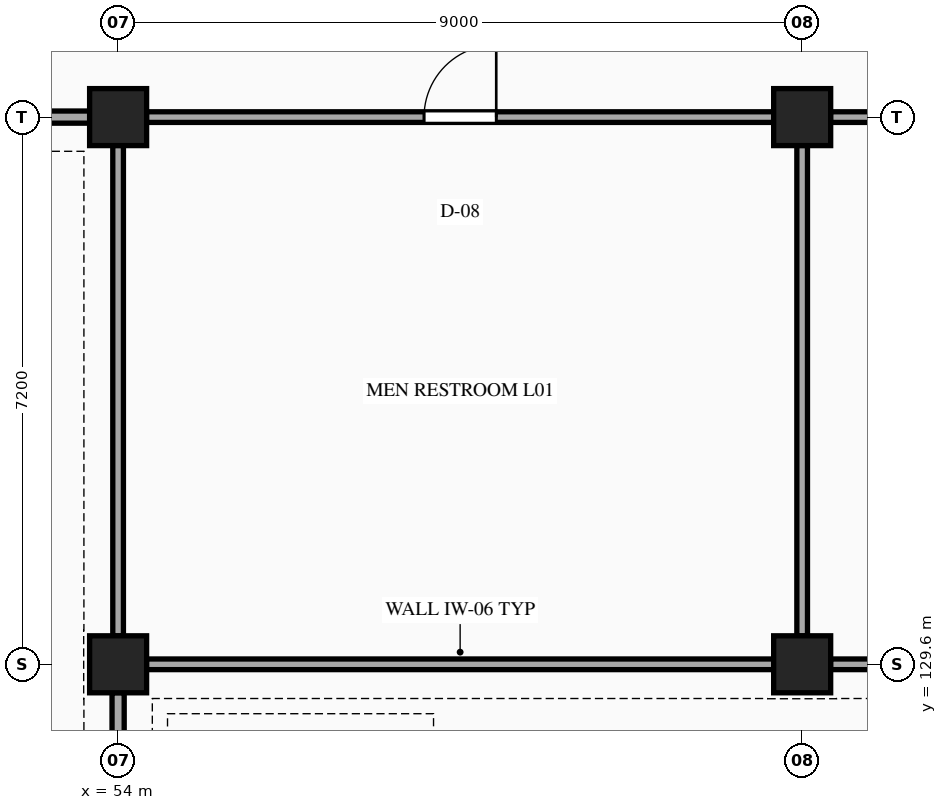
"""IFC4 building model, lengths in metres.
Left out: names, types, materials, properties, quantities, classifications, styles, units other than length and angle.
Written with IfcOpenShell. Run it as: python <this file> out.ifc"""

import sys

from ifc_helpers import new_model, si_unit, direction, frame, frame_2d, origin, origin_2d, place, context, subcontext, project, spatial, rectangle, extrude, element, fill, save


model = new_model("IFC4")
c1 = context("Model", 3, precision=1e-05, world=origin(), true_north=direction((0.0, 1.0)))
c2 = subcontext(c1, "Body", "Model", "MODEL_VIEW")
j1 = project(units=[si_unit("LENGTHUNIT", "METRE"), si_unit("PLANEANGLEUNIT", "RADIAN")], contexts=[c1])
p1 = place(None, origin())
s1 = spatial("IfcSite", under=j1, at=p1, CompositionType="ELEMENT")
p2 = place(p1, origin())
s2 = spatial("IfcBuilding", under=s1, at=p2, CompositionType="ELEMENT")
p3 = place(p2, frame((0.0, 0.0, 5.4)))
s3 = spatial("IfcBuildingStorey", under=s2, at=p3, CompositionType="ELEMENT", Elevation=5.4)
for number, where, z_axis, x_axis in (
    (1, (54.0, 129.6, 0.0), (0.0, 0.0, 1.0), (1.0, 0.0, 0.0)),
    (2, (54.0, 136.8, 0.0), (0.0, 0.0, 1.0), (1.0, 0.0, 0.0)),
    (3, (63.0, 129.6, 0.0), (0.0, 0.0, 1.0), (1.0, 0.0, 0.0)),
    (4, (63.0, 136.8, 0.0), (0.0, 0.0, 1.0), (1.0, 0.0, 0.0)),
):
    element("IfcColumn", number, at=place(p3, frame(where, z_axis=z_axis, x_axis=x_axis)), inside=s3, PredefinedType="COLUMN", context=c2, shape_type="SweptSolid", body=[
        extrude(rectangle(XDim=0.75, YDim=0.75, at=origin_2d()), origin(), (0.0, 0.0, 1.0), 5.4),
    ])
for number, where, z_axis, x_axis in (
    (5, (54.373, 129.6, 0.0), (0.0, 0.0, 1.0), (1.0, 0.0, 0.0)),
    (6, (63.373, 129.6, 0.0), (0.0, 0.0, 1.0), (1.0, 0.0, 0.0)),
):
    element("IfcWall", number, at=place(p3, frame(where, z_axis=z_axis, x_axis=x_axis)), inside=s3, PredefinedType="PARTITIONING", context=c2, shape_type="SweptSolid", body=[
        extrude(rectangle(XDim=8.254, YDim=0.14, at=frame_2d((4.127, 0.0))), origin(), (0.0, 0.0, 1.0), 4.498),
    ])
p4 = place(p3, frame((46.0, 136.8, 0.0), z_axis=(0.0, 0.0, 1.0), x_axis=(1.0, 0.0, 0.0)))
e7 = element("IfcWall", 7, at=p4, inside=s3, PredefinedType="PARTITIONING", context=c2, shape_type="SweptSolid", body=[
    extrude(rectangle(XDim=7.627, YDim=0.16, at=frame_2d((3.813, 0.0))), origin(), (0.0, 0.0, 1.0), 4.498),
])
p5 = place(p4, frame((3.013, 0.0, 0.0)))
e8 = element("IfcOpeningElement", 8, at=p5, cuts=e7, PredefinedType="OPENING", context=c2, shape_type="SweptSolid", body=[
    extrude(rectangle(XDim=1.6, YDim=2.2, at=frame_2d((0.8, 1.1))), frame((0.0, 0.09, 0.0), z_axis=(0.0, -1.0, 0.0), x_axis=(1.0, 0.0, 0.0)), (0.0, 0.0, 1.0), 0.18),
])
p6 = place(p3, frame((54.373, 136.8, 0.0), z_axis=(0.0, 0.0, 1.0), x_axis=(1.0, 0.0, 0.0)))
e9 = element("IfcWall", 9, at=p6, inside=s3, PredefinedType="PARTITIONING", context=c2, shape_type="SweptSolid", body=[
    extrude(rectangle(XDim=8.254, YDim=0.14, at=frame_2d((4.127, 0.0))), origin(), (0.0, 0.0, 1.0), 4.498),
])
p7 = place(p6, frame((3.652, 0.0, 0.0)))
e10 = element("IfcOpeningElement", 10, at=p7, cuts=e9, PredefinedType="OPENING", context=c2, shape_type="SweptSolid", body=[
    extrude(rectangle(XDim=0.95, YDim=2.1, at=frame_2d((0.475, 1.05))), frame((0.0, 0.08, 0.0), z_axis=(0.0, -1.0, 0.0), x_axis=(1.0, 0.0, 0.0)), (0.0, 0.0, 1.0), 0.16),
])
p8 = place(p3, frame((63.373, 136.8, 0.0), z_axis=(0.0, 0.0, 1.0), x_axis=(1.0, 0.0, 0.0)))
e11 = element("IfcWall", 11, at=p8, inside=s3, PredefinedType="PARTITIONING", context=c2, shape_type="SweptSolid", body=[
    extrude(rectangle(XDim=8.254, YDim=0.14, at=frame_2d((4.127, 0.0))), origin(), (0.0, 0.0, 1.0), 4.498),
])
p9 = place(p8, frame((3.652, 0.0, 0.0)))
e12 = element("IfcOpeningElement", 12, at=p9, cuts=e11, PredefinedType="OPENING", context=c2, shape_type="SweptSolid", body=[
    extrude(rectangle(XDim=0.95, YDim=2.1, at=frame_2d((0.475, 1.05))), frame((0.0, 0.08, 0.0), z_axis=(0.0, -1.0, 0.0), x_axis=(1.0, 0.0, 0.0)), (0.0, 0.0, 1.0), 0.16),
])
p10 = place(p3, frame((54.0, 123.6, 0.0), z_axis=(0.0, 0.0, 1.0), x_axis=(0.0, 1.0, 0.0)))
e13 = element("IfcWall", 13, at=p10, inside=s3, PredefinedType="PARTITIONING", context=c2, shape_type="SweptSolid", body=[
    extrude(rectangle(XDim=5.627, YDim=0.16, at=frame_2d((2.813, 0.0))), origin(), (0.0, 0.0, 1.0), 4.508),
])
for number, where, z_axis, x_axis in (
    (14, (54.0, 129.973, 0.0), (0.0, 0.0, 1.0), (0.0, 1.0, 0.0)),
    (15, (63.0, 129.973, 0.0), (0.0, 0.0, 1.0), (0.0, 1.0, 0.0)),
):
    element("IfcWall", number, at=place(p3, frame(where, z_axis=z_axis, x_axis=x_axis)), inside=s3, PredefinedType="PARTITIONING", context=c2, shape_type="SweptSolid", body=[
        extrude(rectangle(XDim=6.454, YDim=0.14, at=frame_2d((3.227, 0.0))), origin(), (0.0, 0.0, 1.0), 4.508),
    ])
p11 = place(p7, origin())
e16 = element("IfcDoor", 16, at=p11, inside=s3, OperationType="SINGLE_SWING_RIGHT", PredefinedType="DOOR", context=c2, shape_type="SweptSolid", body=[
    extrude(rectangle(XDim=0.95, YDim=2.1, at=frame_2d((0.475, 1.05))), frame((0.0, 0.025, 0.0), z_axis=(0.0, -1.0, 0.0), x_axis=(1.0, 0.0, 0.0)), (0.0, 0.0, 1.0), 0.05),
])
fill(e10, e16)
save(model, sys.argv[1])
